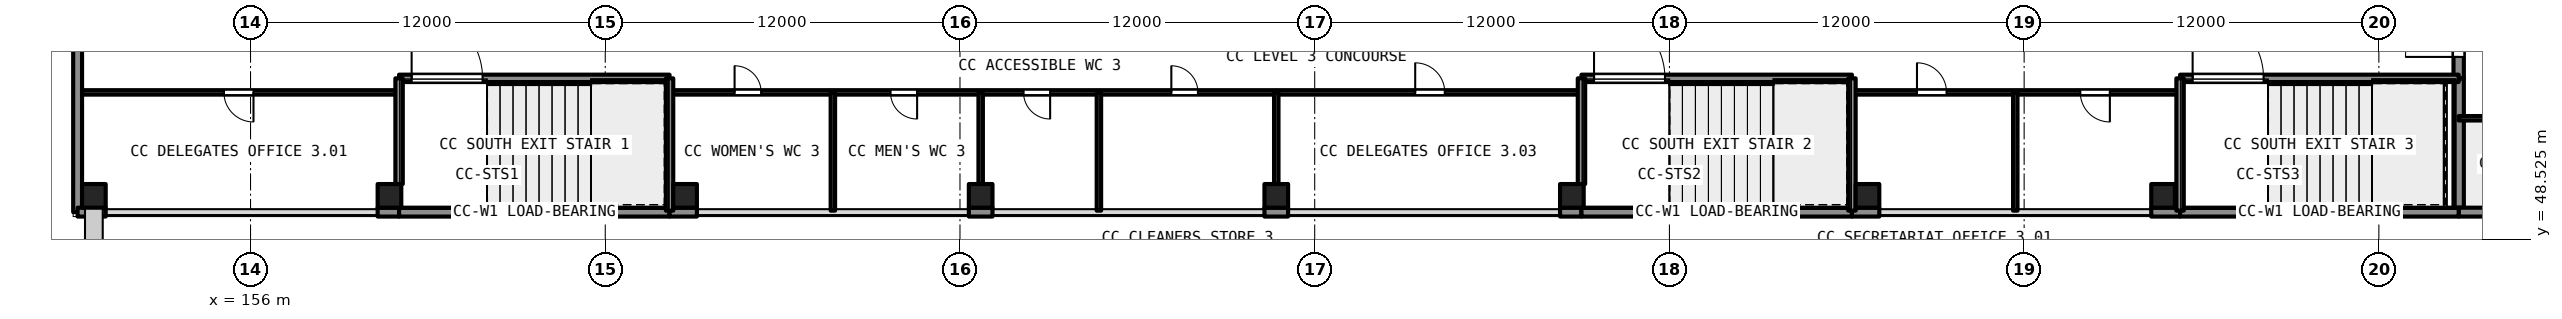
"""IFC4 building model, lengths in metres.
Left out: names, types, materials, properties, quantities, classifications, styles, units other than length and angle.
Written with IfcOpenShell. Run it as: python <this file> out.ifc"""

import sys

from ifc_helpers import new_model, si_unit, direction, frame, frame_2d, origin, origin_2d, place, context, subcontext, project, spatial, rectangle, extrude, element, fill, save


model = new_model("IFC4")
c1 = context("Model", 3, precision=1e-05, world=origin(), true_north=direction((0.0, 1.0)))
c2 = subcontext(c1, "Body", "Model", "MODEL_VIEW")
j1 = project(units=[si_unit("LENGTHUNIT", "METRE"), si_unit("PLANEANGLEUNIT", "RADIAN")], contexts=[c1])
p1 = place(None, origin())
s1 = spatial("IfcSite", under=j1, at=p1, CompositionType="ELEMENT")
p2 = place(p1, origin())
s2 = spatial("IfcBuilding", under=s1, at=p2, CompositionType="ELEMENT")
p3 = place(p2, frame((0.0, 0.0, 20.4)))
s3 = spatial("IfcBuildingStorey", under=s2, at=p3, CompositionType="ELEMENT", Elevation=20.4)
for number, where, z_axis, x_axis in (
    (1, (150.7, 50.0, 0.0), (0.0, 0.0, 1.0), (1.0, 0.0, 0.0)),
    (2, (160.7, 50.0, 0.0), (0.0, 0.0, 1.0), (1.0, 0.0, 0.0)),
    (3, (170.7, 50.0, 0.0), (0.0, 0.0, 1.0), (1.0, 0.0, 0.0)),
    (4, (180.7, 50.0, 0.0), (0.0, 0.0, 1.0), (1.0, 0.0, 0.0)),
    (5, (190.7, 50.0, 0.0), (0.0, 0.0, 1.0), (1.0, 0.0, 0.0)),
    (6, (200.7, 50.0, 0.0), (0.0, 0.0, 1.0), (1.0, 0.0, 0.0)),
    (7, (210.7, 50.0, 0.0), (0.0, 0.0, 1.0), (1.0, 0.0, 0.0)),
    (8, (220.7, 50.0, 0.0), (0.0, 0.0, 1.0), (1.0, 0.0, 0.0)),
):
    element("IfcColumn", number, at=place(p3, frame(where, z_axis=z_axis, x_axis=x_axis)), inside=s3, PredefinedType="COLUMN", context=c2, shape_type="SweptSolid", body=[
        extrude(rectangle(XDim=0.8, YDim=0.8, at=origin_2d()), origin(), (0.0, 0.0, 1.0), 4.59),
    ])
p4 = place(p3, frame((230.7, 49.6, 0.0), z_axis=(0.0, 0.0, 1.0), x_axis=(0.0, 1.0, 0.0)))
e9 = element("IfcWall", 9, at=p4, inside=s3, PredefinedType="SHEAR", context=c2, shape_type="SweptSolid", body=[
    extrude(rectangle(XDim=4.375, YDim=0.35, at=frame_2d((2.188, 0.0))), origin(), (0.0, 0.0, 1.0), 4.59),
])
p5 = place(p3, frame((230.7, 53.975, 0.0), z_axis=(0.0, 0.0, 1.0), x_axis=(0.0, 1.0, 0.0)))
e10 = element("IfcWall", 10, at=p5, inside=s3, PredefinedType="SHEAR", context=c2, shape_type="SweptSolid", body=[
    extrude(rectangle(XDim=2.875, YDim=0.35, at=frame_2d((1.438, 0.0))), origin(), (0.0, 0.0, 1.0), 4.59),
])
p6 = place(p5, frame((0.725, 0.0, 0.0)))
e11 = element("IfcOpeningElement", 11, at=p6, cuts=e10, PredefinedType="OPENING", context=c2, shape_type="SweptSolid", body=[
    extrude(rectangle(XDim=1.8, YDim=2.1, at=frame_2d((0.9, 1.05))), frame((0.0, 0.186, 0.0), z_axis=(0.0, -1.0, 0.0), x_axis=(1.0, 0.0, 0.0)), (0.0, 0.0, 1.0), 0.371),
])
p7 = place(p3, frame((230.7, 49.45, 0.0), z_axis=(0.0, 0.0, 1.0), x_axis=(1.0, 0.0, 0.0)))
e12 = element("IfcWall", 12, at=p7, inside=s3, PredefinedType="SOLIDWALL", context=c2, shape_type="SweptSolid", body=[
    extrude(rectangle(XDim=6.825, YDim=0.3, at=frame_2d((3.413, 0.0))), origin(), (0.0, 0.0, 1.0), 4.59),
])
p8 = place(p3, frame((237.525, 52.625, 0.0), z_axis=(0.0, 0.0, 1.0), x_axis=(-1.0, 0.0, 0.0)))
e13 = element("IfcWall", 13, at=p8, inside=s3, PredefinedType="PARTITIONING", context=c2, shape_type="SweptSolid", body=[
    extrude(rectangle(XDim=6.825, YDim=0.15, at=frame_2d((3.413, 0.0))), origin(), (0.0, 0.0, 1.0), 4.59),
])
p9 = place(p8, frame((2.975, 0.0, 0.0)))
e14 = element("IfcOpeningElement", 14, at=p9, cuts=e13, PredefinedType="OPENING", context=c2, shape_type="SweptSolid", body=[
    extrude(rectangle(XDim=0.9, YDim=2.1, at=frame_2d((0.45, 1.05))), frame((0.0, 0.085, 0.0), z_axis=(0.0, -1.0, 0.0), x_axis=(1.0, 0.0, 0.0)), (0.0, 0.0, 1.0), 0.171),
])
p10 = place(p3, frame((150.15, 49.45, 0.0), z_axis=(0.0, 0.0, 1.0), x_axis=(0.0, 1.0, 0.0)))
e15 = element("IfcWall", 15, at=p10, inside=s3, PredefinedType="SOLIDWALL", context=c2, shape_type="SweptSolid", body=[
    extrude(rectangle(XDim=50.55, YDim=0.3, at=frame_2d((25.275, 0.0))), origin(), (0.0, 0.0, 1.0), 4.59),
])
p11 = place(p10, frame((14.25, 0.0, 0.9)))
e16 = element("IfcOpeningElement", 16, at=p11, cuts=e15, PredefinedType="OPENING", context=c2, shape_type="SweptSolid", body=[
    extrude(rectangle(XDim=2.4, YDim=1.8, at=frame_2d((1.2, 0.9))), frame((0.0, 0.161, 0.0), z_axis=(0.0, -1.0, 0.0), x_axis=(1.0, 0.0, 0.0)), (0.0, 0.0, 1.0), 0.321),
])
p12 = place(p10, frame((24.25, 0.0, 0.9)))
e17 = element("IfcOpeningElement", 17, at=p12, cuts=e15, PredefinedType="OPENING", context=c2, shape_type="SweptSolid", body=[
    extrude(rectangle(XDim=2.4, YDim=1.8, at=frame_2d((1.2, 0.9))), frame((0.0, 0.161, 0.0), z_axis=(0.0, -1.0, 0.0), x_axis=(1.0, 0.0, 0.0)), (0.0, 0.0, 1.0), 0.321),
])
p13 = place(p10, frame((34.25, 0.0, 0.9)))
e18 = element("IfcOpeningElement", 18, at=p13, cuts=e15, PredefinedType="OPENING", context=c2, shape_type="SweptSolid", body=[
    extrude(rectangle(XDim=2.4, YDim=1.8, at=frame_2d((1.2, 0.9))), frame((0.0, 0.161, 0.0), z_axis=(0.0, -1.0, 0.0), x_axis=(1.0, 0.0, 0.0)), (0.0, 0.0, 1.0), 0.321),
])
p14 = place(p10, frame((44.25, 0.0, 0.9)))
e19 = element("IfcOpeningElement", 19, at=p14, cuts=e15, PredefinedType="OPENING", context=c2, shape_type="SweptSolid", body=[
    extrude(rectangle(XDim=2.4, YDim=1.8, at=frame_2d((1.2, 0.9))), frame((0.0, 0.161, 0.0), z_axis=(0.0, -1.0, 0.0), x_axis=(1.0, 0.0, 0.0)), (0.0, 0.0, 1.0), 0.321),
])
p15 = place(p3, frame((150.15, 49.45, 0.0), z_axis=(0.0, 0.0, 1.0), x_axis=(1.0, 0.0, 0.0)))
e20 = element("IfcWall", 20, at=p15, inside=s3, PredefinedType="SOLIDWALL", context=c2, shape_type="SweptSolid", body=[
    extrude(rectangle(XDim=0.95, YDim=0.3, at=frame_2d((0.475, 0.0))), origin(), (0.0, 0.0, 1.0), 4.59),
])
p16 = place(p3, frame((160.3, 49.45, 0.0), z_axis=(0.0, 0.0, 1.0), x_axis=(1.0, 0.0, 0.0)))
e21 = element("IfcWall", 21, at=p16, inside=s3, PredefinedType="SOLIDWALL", context=c2, shape_type="SweptSolid", body=[
    extrude(rectangle(XDim=0.725, YDim=0.3, at=frame_2d((0.362, 0.0))), origin(), (0.0, 0.0, 1.0), 4.59),
])
p17 = place(p3, frame((161.025, 49.45, 0.0), z_axis=(0.0, 0.0, 1.0), x_axis=(1.0, 0.0, 0.0)))
e22 = element("IfcWall", 22, at=p17, inside=s3, PredefinedType="SOLIDWALL", context=c2, shape_type="SweptSolid", body=[
    extrude(rectangle(XDim=9.15, YDim=0.3, at=frame_2d((4.575, 0.0))), origin(), (0.0, 0.0, 1.0), 4.59),
])
p18 = place(p3, frame((170.175, 49.45, 0.0), z_axis=(0.0, 0.0, 1.0), x_axis=(1.0, 0.0, 0.0)))
e23 = element("IfcWall", 23, at=p18, inside=s3, PredefinedType="SOLIDWALL", context=c2, shape_type="SweptSolid", body=[
    extrude(rectangle(XDim=0.925, YDim=0.3, at=frame_2d((0.462, 0.0))), origin(), (0.0, 0.0, 1.0), 4.59),
])
for number, where, z_axis, x_axis in (
    (24, (180.3, 49.45, 0.0), (0.0, 0.0, 1.0), (1.0, 0.0, 0.0)),
    (25, (190.3, 49.45, 0.0), (0.0, 0.0, 1.0), (1.0, 0.0, 0.0)),
):
    element("IfcWall", number, at=place(p3, frame(where, z_axis=z_axis, x_axis=x_axis)), inside=s3, PredefinedType="SOLIDWALL", context=c2, shape_type="SweptSolid", body=[
        extrude(rectangle(XDim=0.8, YDim=0.3, at=frame_2d((0.4, 0.0))), origin(), (0.0, 0.0, 1.0), 4.59),
    ])
p19 = place(p3, frame((200.3, 49.45, 0.0), z_axis=(0.0, 0.0, 1.0), x_axis=(1.0, 0.0, 0.0)))
e26 = element("IfcWall", 26, at=p19, inside=s3, PredefinedType="SOLIDWALL", context=c2, shape_type="SweptSolid", body=[
    extrude(rectangle(XDim=0.725, YDim=0.3, at=frame_2d((0.362, 0.0))), origin(), (0.0, 0.0, 1.0), 4.59),
])
p20 = place(p3, frame((201.025, 49.45, 0.0), z_axis=(0.0, 0.0, 1.0), x_axis=(1.0, 0.0, 0.0)))
e27 = element("IfcWall", 27, at=p20, inside=s3, PredefinedType="SOLIDWALL", context=c2, shape_type="SweptSolid", body=[
    extrude(rectangle(XDim=9.15, YDim=0.3, at=frame_2d((4.575, 0.0))), origin(), (0.0, 0.0, 1.0), 4.59),
])
p21 = place(p3, frame((210.175, 49.45, 0.0), z_axis=(0.0, 0.0, 1.0), x_axis=(1.0, 0.0, 0.0)))
e28 = element("IfcWall", 28, at=p21, inside=s3, PredefinedType="SOLIDWALL", context=c2, shape_type="SweptSolid", body=[
    extrude(rectangle(XDim=0.925, YDim=0.3, at=frame_2d((0.462, 0.0))), origin(), (0.0, 0.0, 1.0), 4.59),
])
p22 = place(p3, frame((220.3, 49.45, 0.0), z_axis=(0.0, 0.0, 1.0), x_axis=(1.0, 0.0, 0.0)))
e29 = element("IfcWall", 29, at=p22, inside=s3, PredefinedType="SOLIDWALL", context=c2, shape_type="SweptSolid", body=[
    extrude(rectangle(XDim=0.975, YDim=0.3, at=frame_2d((0.487, 0.0))), origin(), (0.0, 0.0, 1.0), 4.59),
])
p23 = place(p3, frame((221.275, 49.45, 0.0), z_axis=(0.0, 0.0, 1.0), x_axis=(1.0, 0.0, 0.0)))
e30 = element("IfcWall", 30, at=p23, inside=s3, PredefinedType="SOLIDWALL", context=c2, shape_type="SweptSolid", body=[
    extrude(rectangle(XDim=9.425, YDim=0.3, at=frame_2d((4.712, 0.0))), origin(), (0.0, 0.0, 1.0), 4.59),
])
p24 = place(p3, frame((150.3, 53.5, 0.0), z_axis=(0.0, 0.0, 1.0), x_axis=(1.0, 0.0, 0.0)))
e31 = element("IfcWall", 31, at=p24, inside=s3, PredefinedType="PARTITIONING", context=c2, shape_type="SweptSolid", body=[
    extrude(rectangle(XDim=10.725, YDim=0.15, at=frame_2d((5.362, 0.0))), origin(), (0.0, 0.0, 1.0), 4.59),
])
p25 = place(p24, frame((4.8, 0.0, 0.0)))
e32 = element("IfcOpeningElement", 32, at=p25, cuts=e31, PredefinedType="OPENING", context=c2, shape_type="SweptSolid", body=[
    extrude(rectangle(XDim=1.0, YDim=2.1, at=frame_2d((0.5, 1.05))), frame((0.0, 0.085, 0.0), z_axis=(0.0, -1.0, 0.0), x_axis=(1.0, 0.0, 0.0)), (0.0, 0.0, 1.0), 0.171),
])
p26 = place(p3, frame((170.175, 53.5, 0.0), z_axis=(0.0, 0.0, 1.0), x_axis=(1.0, 0.0, 0.0)))
e33 = element("IfcWall", 33, at=p26, inside=s3, PredefinedType="PARTITIONING", context=c2, shape_type="SweptSolid", body=[
    extrude(rectangle(XDim=30.85, YDim=0.15, at=frame_2d((15.425, 0.0))), origin(), (0.0, 0.0, 1.0), 4.59),
])
p27 = place(p26, frame((11.975, 0.0, 0.0)))
e34 = element("IfcOpeningElement", 34, at=p27, cuts=e33, PredefinedType="OPENING", context=c2, shape_type="SweptSolid", body=[
    extrude(rectangle(XDim=0.9, YDim=2.1, at=frame_2d((0.45, 1.05))), frame((0.0, 0.085, 0.0), z_axis=(0.0, -1.0, 0.0), x_axis=(1.0, 0.0, 0.0)), (0.0, 0.0, 1.0), 0.171),
])
p28 = place(p26, frame((16.975, 0.0, 0.0)))
e35 = element("IfcOpeningElement", 35, at=p28, cuts=e33, PredefinedType="OPENING", context=c2, shape_type="SweptSolid", body=[
    extrude(rectangle(XDim=0.9, YDim=2.1, at=frame_2d((0.45, 1.05))), frame((0.0, 0.085, 0.0), z_axis=(0.0, -1.0, 0.0), x_axis=(1.0, 0.0, 0.0)), (0.0, 0.0, 1.0), 0.171),
])
p29 = place(p26, frame((25.225, 0.0, 0.0)))
e36 = element("IfcOpeningElement", 36, at=p29, cuts=e33, PredefinedType="OPENING", context=c2, shape_type="SweptSolid", body=[
    extrude(rectangle(XDim=1.0, YDim=2.1, at=frame_2d((0.5, 1.05))), frame((0.0, 0.085, 0.0), z_axis=(0.0, -1.0, 0.0), x_axis=(1.0, 0.0, 0.0)), (0.0, 0.0, 1.0), 0.171),
])
p30 = place(p26, frame((7.475, 0.0, 0.0)))
e37 = element("IfcOpeningElement", 37, at=p30, cuts=e33, PredefinedType="OPENING", context=c2, shape_type="SweptSolid", body=[
    extrude(rectangle(XDim=0.9, YDim=2.1, at=frame_2d((0.45, 1.05))), frame((0.0, 0.085, 0.0), z_axis=(0.0, -1.0, 0.0), x_axis=(1.0, 0.0, 0.0)), (0.0, 0.0, 1.0), 0.171),
])
p31 = place(p26, frame((2.2, 0.0, 0.0)))
e38 = element("IfcOpeningElement", 38, at=p31, cuts=e33, PredefinedType="OPENING", context=c2, shape_type="SweptSolid", body=[
    extrude(rectangle(XDim=0.9, YDim=2.1, at=frame_2d((0.45, 1.05))), frame((0.0, 0.085, 0.0), z_axis=(0.0, -1.0, 0.0), x_axis=(1.0, 0.0, 0.0)), (0.0, 0.0, 1.0), 0.171),
])
p32 = place(p3, frame((210.175, 53.5, 0.0), z_axis=(0.0, 0.0, 1.0), x_axis=(1.0, 0.0, 0.0)))
e39 = element("IfcWall", 39, at=p32, inside=s3, PredefinedType="PARTITIONING", context=c2, shape_type="SweptSolid", body=[
    extrude(rectangle(XDim=11.1, YDim=0.15, at=frame_2d((5.55, 0.0))), origin(), (0.0, 0.0, 1.0), 4.59),
])
p33 = place(p32, frame((2.2, 0.0, 0.0)))
e40 = element("IfcOpeningElement", 40, at=p33, cuts=e39, PredefinedType="OPENING", context=c2, shape_type="SweptSolid", body=[
    extrude(rectangle(XDim=1.0, YDim=2.1, at=frame_2d((0.5, 1.05))), frame((0.0, 0.085, 0.0), z_axis=(0.0, -1.0, 0.0), x_axis=(1.0, 0.0, 0.0)), (0.0, 0.0, 1.0), 0.171),
])
p34 = place(p32, frame((7.725, 0.0, 0.0)))
e41 = element("IfcOpeningElement", 41, at=p34, cuts=e39, PredefinedType="OPENING", context=c2, shape_type="SweptSolid", body=[
    extrude(rectangle(XDim=1.0, YDim=2.1, at=frame_2d((0.5, 1.05))), frame((0.0, 0.085, 0.0), z_axis=(0.0, -1.0, 0.0), x_axis=(1.0, 0.0, 0.0)), (0.0, 0.0, 1.0), 0.171),
])
p35 = place(p3, frame((161.025, 53.975, 0.0), z_axis=(0.0, 0.0, 1.0), x_axis=(1.0, 0.0, 0.0)))
e42 = element("IfcWall", 42, at=p35, inside=s3, PredefinedType="SHEAR", context=c2, shape_type="SweptSolid", body=[
    extrude(rectangle(XDim=9.15, YDim=0.25, at=frame_2d((4.575, 0.0))), origin(), (0.0, 0.0, 1.0), 4.59),
])
p36 = place(p35, frame((0.425, 0.0, 0.0)))
e43 = element("IfcOpeningElement", 43, at=p36, cuts=e42, PredefinedType="OPENING", context=c2, shape_type="SweptSolid", body=[
    extrude(rectangle(XDim=2.4, YDim=2.1, at=frame_2d((1.2, 1.05))), frame((0.0, 0.135, 0.0), z_axis=(0.0, -1.0, 0.0), x_axis=(1.0, 0.0, 0.0)), (0.0, 0.0, 1.0), 0.271),
])
p37 = place(p3, frame((161.025, 50.4, 0.0), z_axis=(0.0, 0.0, 1.0), x_axis=(0.0, 1.0, 0.0)))
e44 = element("IfcWall", 44, at=p37, inside=s3, PredefinedType="SHEAR", context=c2, shape_type="SweptSolid", body=[
    extrude(rectangle(XDim=3.575, YDim=0.25, at=frame_2d((1.788, 0.0))), origin(), (0.0, 0.0, 1.0), 4.59),
])
p38 = place(p3, frame((170.175, 49.5, 0.0), z_axis=(0.0, 0.0, 1.0), x_axis=(0.0, 1.0, 0.0)))
e45 = element("IfcWall", 45, at=p38, inside=s3, PredefinedType="SHEAR", context=c2, shape_type="SweptSolid", body=[
    extrude(rectangle(XDim=4.475, YDim=0.25, at=frame_2d((2.238, 0.0))), origin(), (0.0, 0.0, 1.0), 4.59),
])
p39 = place(p3, frame((201.025, 53.975, 0.0), z_axis=(0.0, 0.0, 1.0), x_axis=(1.0, 0.0, 0.0)))
e46 = element("IfcWall", 46, at=p39, inside=s3, PredefinedType="SHEAR", context=c2, shape_type="SweptSolid", body=[
    extrude(rectangle(XDim=9.15, YDim=0.25, at=frame_2d((4.575, 0.0))), origin(), (0.0, 0.0, 1.0), 4.59),
])
p40 = place(p39, frame((0.425, 0.0, 0.0)))
e47 = element("IfcOpeningElement", 47, at=p40, cuts=e46, PredefinedType="OPENING", context=c2, shape_type="SweptSolid", body=[
    extrude(rectangle(XDim=2.4, YDim=2.1, at=frame_2d((1.2, 1.05))), frame((0.0, 0.135, 0.0), z_axis=(0.0, -1.0, 0.0), x_axis=(1.0, 0.0, 0.0)), (0.0, 0.0, 1.0), 0.271),
])
p41 = place(p3, frame((201.025, 50.4, 0.0), z_axis=(0.0, 0.0, 1.0), x_axis=(0.0, 1.0, 0.0)))
e48 = element("IfcWall", 48, at=p41, inside=s3, PredefinedType="SHEAR", context=c2, shape_type="SweptSolid", body=[
    extrude(rectangle(XDim=3.575, YDim=0.25, at=frame_2d((1.788, 0.0))), origin(), (0.0, 0.0, 1.0), 4.59),
])
p42 = place(p3, frame((210.175, 49.5, 0.0), z_axis=(0.0, 0.0, 1.0), x_axis=(0.0, 1.0, 0.0)))
e49 = element("IfcWall", 49, at=p42, inside=s3, PredefinedType="SHEAR", context=c2, shape_type="SweptSolid", body=[
    extrude(rectangle(XDim=4.475, YDim=0.25, at=frame_2d((2.238, 0.0))), origin(), (0.0, 0.0, 1.0), 4.59),
])
p43 = place(p3, frame((221.275, 53.975, 0.0), z_axis=(0.0, 0.0, 1.0), x_axis=(1.0, 0.0, 0.0)))
e50 = element("IfcWall", 50, at=p43, inside=s3, PredefinedType="SHEAR", context=c2, shape_type="SweptSolid", body=[
    extrude(rectangle(XDim=9.425, YDim=0.25, at=frame_2d((4.712, 0.0))), origin(), (0.0, 0.0, 1.0), 4.59),
])
p44 = place(p43, frame((0.425, 0.0, 0.0)))
e51 = element("IfcOpeningElement", 51, at=p44, cuts=e50, PredefinedType="OPENING", context=c2, shape_type="SweptSolid", body=[
    extrude(rectangle(XDim=2.4, YDim=2.1, at=frame_2d((1.2, 1.05))), frame((0.0, 0.135, 0.0), z_axis=(0.0, -1.0, 0.0), x_axis=(1.0, 0.0, 0.0)), (0.0, 0.0, 1.0), 0.271),
])
p45 = place(p3, frame((221.275, 49.5, 0.0), z_axis=(0.0, 0.0, 1.0), x_axis=(0.0, 1.0, 0.0)))
e52 = element("IfcWall", 52, at=p45, inside=s3, PredefinedType="SHEAR", context=c2, shape_type="SweptSolid", body=[
    extrude(rectangle(XDim=4.475, YDim=0.25, at=frame_2d((2.238, 0.0))), origin(), (0.0, 0.0, 1.0), 4.59),
])
p46 = place(p3, frame((175.7, 49.5, 0.0), z_axis=(0.0, 0.0, 1.0), x_axis=(0.0, 1.0, 0.0)))
e53 = element("IfcWall", 53, at=p46, inside=s3, PredefinedType="PARTITIONING", context=c2, shape_type="SweptSolid", body=[
    extrude(rectangle(XDim=4.0, YDim=0.15, at=frame_2d((2.0, 0.0))), origin(), (0.0, 0.0, 1.0), 4.59),
])
p47 = place(p3, frame((180.7, 50.4, 0.0), z_axis=(0.0, 0.0, 1.0), x_axis=(0.0, 1.0, 0.0)))
e54 = element("IfcWall", 54, at=p47, inside=s3, PredefinedType="PARTITIONING", context=c2, shape_type="SweptSolid", body=[
    extrude(rectangle(XDim=3.1, YDim=0.15, at=frame_2d((1.55, 0.0))), origin(), (0.0, 0.0, 1.0), 4.59),
])
p48 = place(p3, frame((184.7, 49.5, 0.0), z_axis=(0.0, 0.0, 1.0), x_axis=(0.0, 1.0, 0.0)))
e55 = element("IfcWall", 55, at=p48, inside=s3, PredefinedType="PARTITIONING", context=c2, shape_type="SweptSolid", body=[
    extrude(rectangle(XDim=4.0, YDim=0.15, at=frame_2d((2.0, 0.0))), origin(), (0.0, 0.0, 1.0), 4.59),
])
p49 = place(p3, frame((190.7, 50.4, 0.0), z_axis=(0.0, 0.0, 1.0), x_axis=(0.0, 1.0, 0.0)))
e56 = element("IfcWall", 56, at=p49, inside=s3, PredefinedType="PARTITIONING", context=c2, shape_type="SweptSolid", body=[
    extrude(rectangle(XDim=3.1, YDim=0.15, at=frame_2d((1.55, 0.0))), origin(), (0.0, 0.0, 1.0), 4.59),
])
p50 = place(p3, frame((215.7, 49.5, 0.0), z_axis=(0.0, 0.0, 1.0), x_axis=(0.0, 1.0, 0.0)))
e57 = element("IfcWall", 57, at=p50, inside=s3, PredefinedType="PARTITIONING", context=c2, shape_type="SweptSolid", body=[
    extrude(rectangle(XDim=4.0, YDim=0.15, at=frame_2d((2.0, 0.0))), origin(), (0.0, 0.0, 1.0), 4.59),
])
p51 = place(p27, origin())
e58 = element("IfcDoor", 58, at=p51, inside=s3, OperationType="SINGLE_SWING_RIGHT", PredefinedType="DOOR", context=c2, shape_type="SweptSolid", body=[
    extrude(rectangle(XDim=0.9, YDim=2.1, at=frame_2d((0.45, 1.05))), frame((0.0, 0.025, 0.0), z_axis=(0.0, -1.0, 0.0), x_axis=(1.0, 0.0, 0.0)), (0.0, 0.0, 1.0), 0.05),
])
fill(e34, e58)
p52 = place(p28, origin())
e59 = element("IfcDoor", 59, at=p52, inside=s3, OperationType="SINGLE_SWING_LEFT", PredefinedType="DOOR", context=c2, shape_type="SweptSolid", body=[
    extrude(rectangle(XDim=0.9, YDim=2.1, at=frame_2d((0.45, 1.05))), frame((0.0, 0.025, 0.0), z_axis=(0.0, -1.0, 0.0), x_axis=(1.0, 0.0, 0.0)), (0.0, 0.0, 1.0), 0.05),
])
fill(e35, e59)
p53 = place(p25, origin())
e60 = element("IfcDoor", 60, at=p53, inside=s3, OperationType="SINGLE_SWING_RIGHT", PredefinedType="DOOR", context=c2, shape_type="SweptSolid", body=[
    extrude(rectangle(XDim=1.0, YDim=2.1, at=frame_2d((0.5, 1.05))), frame((0.0, 0.025, 0.0), z_axis=(0.0, -1.0, 0.0), x_axis=(1.0, 0.0, 0.0)), (0.0, 0.0, 1.0), 0.05),
])
fill(e32, e60)
p54 = place(p29, origin())
e61 = element("IfcDoor", 61, at=p54, inside=s3, OperationType="SINGLE_SWING_LEFT", PredefinedType="DOOR", context=c2, shape_type="SweptSolid", body=[
    extrude(rectangle(XDim=1.0, YDim=2.1, at=frame_2d((0.5, 1.05))), frame((0.0, 0.025, 0.0), z_axis=(0.0, -1.0, 0.0), x_axis=(1.0, 0.0, 0.0)), (0.0, 0.0, 1.0), 0.05),
])
fill(e36, e61)
p55 = place(p30, origin())
e62 = element("IfcDoor", 62, at=p55, inside=s3, OperationType="SINGLE_SWING_RIGHT", PredefinedType="DOOR", context=c2, shape_type="SweptSolid", body=[
    extrude(rectangle(XDim=0.9, YDim=2.1, at=frame_2d((0.45, 1.05))), frame((0.0, 0.025, 0.0), z_axis=(0.0, -1.0, 0.0), x_axis=(1.0, 0.0, 0.0)), (0.0, 0.0, 1.0), 0.05),
])
fill(e37, e62)
p56 = place(p33, origin())
e63 = element("IfcDoor", 63, at=p56, inside=s3, OperationType="SINGLE_SWING_LEFT", PredefinedType="DOOR", context=c2, shape_type="SweptSolid", body=[
    extrude(rectangle(XDim=1.0, YDim=2.1, at=frame_2d((0.5, 1.05))), frame((0.0, 0.025, 0.0), z_axis=(0.0, -1.0, 0.0), x_axis=(1.0, 0.0, 0.0)), (0.0, 0.0, 1.0), 0.05),
])
fill(e40, e63)
p57 = place(p34, origin())
e64 = element("IfcDoor", 64, at=p57, inside=s3, OperationType="SINGLE_SWING_RIGHT", PredefinedType="DOOR", context=c2, shape_type="SweptSolid", body=[
    extrude(rectangle(XDim=1.0, YDim=2.1, at=frame_2d((0.5, 1.05))), frame((0.0, 0.025, 0.0), z_axis=(0.0, -1.0, 0.0), x_axis=(1.0, 0.0, 0.0)), (0.0, 0.0, 1.0), 0.05),
])
fill(e41, e64)
p58 = place(p31, origin())
e65 = element("IfcDoor", 65, at=p58, inside=s3, OperationType="SINGLE_SWING_LEFT", PredefinedType="DOOR", context=c2, shape_type="SweptSolid", body=[
    extrude(rectangle(XDim=0.9, YDim=2.1, at=frame_2d((0.45, 1.05))), frame((0.0, 0.025, 0.0), z_axis=(0.0, -1.0, 0.0), x_axis=(1.0, 0.0, 0.0)), (0.0, 0.0, 1.0), 0.05),
])
fill(e38, e65)
p59 = place(p6, origin())
e66 = element("IfcDoor", 66, at=p59, inside=s3, OperationType="DOUBLE_DOOR_SINGLE_SWING", PredefinedType="DOOR", context=c2, shape_type="SweptSolid", body=[
    extrude(rectangle(XDim=1.8, YDim=2.1, at=frame_2d((0.9, 1.05))), frame((0.0, 0.025, 0.0), z_axis=(0.0, -1.0, 0.0), x_axis=(1.0, 0.0, 0.0)), (0.0, 0.0, 1.0), 0.05),
])
fill(e11, e66)
p60 = place(p36, origin())
e67 = element("IfcDoor", 67, at=p60, inside=s3, OperationType="DOUBLE_DOOR_SINGLE_SWING", PredefinedType="DOOR", context=c2, shape_type="SweptSolid", body=[
    extrude(rectangle(XDim=2.4, YDim=2.1, at=frame_2d((1.2, 1.05))), frame((0.0, 0.025, 0.0), z_axis=(0.0, -1.0, 0.0), x_axis=(1.0, 0.0, 0.0)), (0.0, 0.0, 1.0), 0.05),
])
fill(e43, e67)
p61 = place(p40, origin())
e68 = element("IfcDoor", 68, at=p61, inside=s3, OperationType="DOUBLE_DOOR_SINGLE_SWING", PredefinedType="DOOR", context=c2, shape_type="SweptSolid", body=[
    extrude(rectangle(XDim=2.4, YDim=2.1, at=frame_2d((1.2, 1.05))), frame((0.0, 0.025, 0.0), z_axis=(0.0, -1.0, 0.0), x_axis=(1.0, 0.0, 0.0)), (0.0, 0.0, 1.0), 0.05),
])
fill(e47, e68)
p62 = place(p44, origin())
e69 = element("IfcDoor", 69, at=p62, inside=s3, OperationType="DOUBLE_DOOR_SINGLE_SWING", PredefinedType="DOOR", context=c2, shape_type="SweptSolid", body=[
    extrude(rectangle(XDim=2.4, YDim=2.1, at=frame_2d((1.2, 1.05))), frame((0.0, 0.025, 0.0), z_axis=(0.0, -1.0, 0.0), x_axis=(1.0, 0.0, 0.0)), (0.0, 0.0, 1.0), 0.05),
])
fill(e51, e69)
save(model, sys.argv[1])
